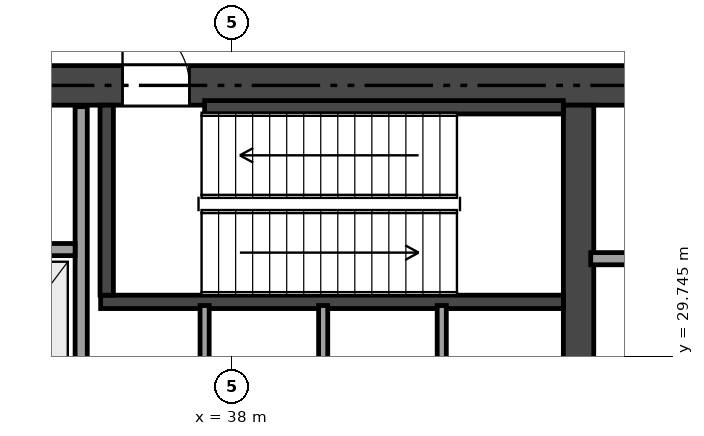
"""IFC4 building model, lengths in metres.
Left out: names, types, materials, properties, quantities, classifications, styles, units other than length and angle.
Written with IfcOpenShell. Run it as: python <this file> out.ifc"""

import sys

from ifc_helpers import new_model, si_unit, direction, frame, frame_2d, origin, place, context, subcontext, project, spatial, rectangle, extrude, element, fill, save


model = new_model("IFC4")
c1 = context("Model", 3, precision=1e-05, world=origin(), true_north=direction((0.0, 1.0)))
c2 = subcontext(c1, "Body", "Model", "MODEL_VIEW")
j1 = project(units=[si_unit("LENGTHUNIT", "METRE"), si_unit("PLANEANGLEUNIT", "RADIAN")], contexts=[c1])
p1 = place(None, origin())
s1 = spatial("IfcSite", under=j1, at=p1, CompositionType="ELEMENT")
p2 = place(p1, origin())
s2 = spatial("IfcBuilding", under=s1, at=p2, CompositionType="ELEMENT")
p3 = place(p2, frame((0.0, 0.0, -5.4)))
s3 = spatial("IfcBuildingStorey", under=s2, at=p3, CompositionType="ELEMENT", Elevation=-5.4)
p4 = place(p3, frame((26.475, 34.2, 0.0), z_axis=(0.0, 0.0, 1.0), x_axis=(1.0, 0.0, 0.0)))
e1 = element("IfcWall", 1, at=p4, inside=s3, PredefinedType="SHEAR", context=c2, shape_type="SweptSolid", body=[
    extrude(rectangle(XDim=21.45, YDim=0.65, at=frame_2d((10.725, 0.0))), origin(), (0.0, 0.0, 1.0), 5.05),
])
p5 = place(p4, frame((9.725, 0.0, 0.0)))
e2 = element("IfcOpeningElement", 2, at=p5, cuts=e1, PredefinedType="OPENING", context=c2, shape_type="SweptSolid", body=[
    extrude(rectangle(XDim=1.1, YDim=2.15, at=frame_2d((0.55, 1.075))), frame((0.0, 0.335, 0.0), z_axis=(0.0, -1.0, 0.0), x_axis=(1.0, 0.0, 0.0)), (0.0, 0.0, 1.0), 0.67),
])
p6 = place(p4, frame((1.975, 0.0, 0.0)))
e3 = element("IfcOpeningElement", 3, at=p6, cuts=e1, PredefinedType="OPENING", context=c2, shape_type="SweptSolid", body=[
    extrude(rectangle(XDim=0.9, YDim=2.1, at=frame_2d((0.45, 1.05))), frame((0.0, 0.335, 0.0), z_axis=(0.0, -1.0, 0.0), x_axis=(1.0, 0.0, 0.0)), (0.0, 0.0, 1.0), 0.67),
])
p7 = place(p4, frame((6.275, 0.0, 0.0)))
e4 = element("IfcOpeningElement", 4, at=p7, cuts=e1, PredefinedType="OPENING", context=c2, shape_type="SweptSolid", body=[
    extrude(rectangle(XDim=0.9, YDim=2.1, at=frame_2d((0.45, 1.05))), frame((0.0, 0.335, 0.0), z_axis=(0.0, -1.0, 0.0), x_axis=(1.0, 0.0, 0.0)), (0.0, 0.0, 1.0), 0.67),
])
p8 = place(p3, frame((43.7, 18.925, 0.0), z_axis=(0.0, 0.0, 1.0), x_axis=(0.0, 1.0, 0.0)))
e5 = element("IfcWall", 5, at=p8, inside=s3, PredefinedType="SHEAR", context=c2, shape_type="SweptSolid", body=[
    extrude(rectangle(XDim=14.95, YDim=0.5, at=frame_2d((7.475, 0.0))), origin(), (0.0, 0.0, 1.0), 5.05),
])
p9 = place(p8, frame((8.075, 0.0, 0.0)))
e6 = element("IfcOpeningElement", 6, at=p9, cuts=e5, PredefinedType="OPENING", context=c2, shape_type="SweptSolid", body=[
    extrude(rectangle(XDim=0.9, YDim=2.1, at=frame_2d((0.45, 1.05))), frame((0.0, 0.26, 0.0), z_axis=(0.0, -1.0, 0.0), x_axis=(1.0, 0.0, 0.0)), (0.0, 0.0, 1.0), 0.52),
])
p10 = place(p3, frame((35.84, 30.64, 0.0), z_axis=(0.0, 0.0, 1.0), x_axis=(1.0, 0.0, 0.0)))
e7 = element("IfcWall", 7, at=p10, inside=s3, PredefinedType="SHEAR", context=c2, shape_type="SweptSolid", body=[
    extrude(rectangle(XDim=7.61, YDim=0.22, at=frame_2d((3.805, 0.0))), origin(), (0.0, 0.0, 1.0), 5.05),
])
p11 = place(p3, frame((35.94, 30.75, 0.0), z_axis=(0.0, 0.0, 1.0), x_axis=(0.0, 1.0, 0.0)))
e8 = element("IfcWall", 8, at=p11, inside=s3, PredefinedType="SHEAR", context=c2, shape_type="SweptSolid", body=[
    extrude(rectangle(XDim=3.125, YDim=0.22, at=frame_2d((1.562, 0.0))), origin(), (0.0, 0.0, 1.0), 5.05),
])
p12 = place(p3, frame((37.55, 33.84, 0.0), z_axis=(0.0, 0.0, 1.0), x_axis=(1.0, 0.0, 0.0)))
e9 = element("IfcWall", 9, at=p12, inside=s3, PredefinedType="SHEAR", context=c2, shape_type="SweptSolid", body=[
    extrude(rectangle(XDim=5.9, YDim=0.22, at=frame_2d((2.95, 0.0))), origin(), (0.0, 0.0, 1.0), 5.05),
])
p13 = place(p3, frame((43.9, 31.35, 0.0), z_axis=(0.0, 0.0, 1.0), x_axis=(1.0, 0.0, 0.0)))
e10 = element("IfcWall", 10, at=p13, inside=s3, PredefinedType="SOLIDWALL", context=c2, shape_type="SweptSolid", body=[
    extrude(rectangle(XDim=3.35, YDim=0.2, at=frame_2d((1.675, 0.0))), origin(), (0.0, 0.0, 1.0), 5.05),
])
p14 = place(p3, frame((35.52, 18.95, 0.0), z_axis=(0.0, 0.0, 1.0), x_axis=(0.0, 1.0, 0.0)))
e11 = element("IfcWall", 11, at=p14, inside=s3, PredefinedType="SOLIDWALL", context=c2, shape_type="SweptSolid", body=[
    extrude(rectangle(XDim=14.9, YDim=0.2, at=frame_2d((7.45, 0.0))), origin(), (0.0, 0.0, 1.0), 4.571),
])
p15 = place(p14, frame((7.755, 0.0, 0.0)))
e12 = element("IfcOpeningElement", 12, at=p15, cuts=e11, PredefinedType="OPENING", context=c2, shape_type="SweptSolid", body=[
    extrude(rectangle(XDim=0.95, YDim=2.15, at=frame_2d((0.475, 1.075))), frame((0.0, 0.11, 0.0), z_axis=(0.0, -1.0, 0.0), x_axis=(1.0, 0.0, 0.0)), (0.0, 0.0, 1.0), 0.22),
])
p16 = place(p14, frame((0.6, 0.0, 0.0)))
e13 = element("IfcOpeningElement", 13, at=p16, cuts=e11, PredefinedType="OPENING", context=c2, shape_type="SweptSolid", body=[
    extrude(rectangle(XDim=0.9, YDim=2.1, at=frame_2d((0.45, 1.05))), frame((0.0, 0.11, 0.0), z_axis=(0.0, -1.0, 0.0), x_axis=(1.0, 0.0, 0.0)), (0.0, 0.0, 1.0), 0.22),
])
p17 = place(p3, frame((31.0, 31.5, 0.0), z_axis=(0.0, 0.0, 1.0), x_axis=(1.0, 0.0, 0.0)))
e14 = element("IfcWall", 14, at=p17, inside=s3, PredefinedType="SOLIDWALL", context=c2, shape_type="SweptSolid", body=[
    extrude(rectangle(XDim=4.42, YDim=0.2, at=frame_2d((2.21, 0.0))), origin(), (0.0, 0.0, 1.0), 5.05),
])
for number, where, z_axis, x_axis in (
    (15, (37.55, 28.15, 0.0), (0.0, 0.0, 1.0), (0.0, 1.0, 0.0)),
    (16, (39.5, 28.15, 0.0), (0.0, 0.0, 1.0), (0.0, 1.0, 0.0)),
    (17, (41.45, 28.15, 0.0), (0.0, 0.0, 1.0), (0.0, 1.0, 0.0)),
):
    element("IfcWall", number, at=place(p3, frame(where, z_axis=z_axis, x_axis=x_axis)), inside=s3, PredefinedType="PARTITIONING", context=c2, shape_type="SweptSolid", body=[
        extrude(rectangle(XDim=2.43, YDim=0.15, at=frame_2d((1.215, 0.0))), origin(), (0.0, 0.0, 1.0), 5.05),
    ])
p18 = place(p5, origin())
e18 = element("IfcDoor", 18, at=p18, inside=s3, OperationType="SINGLE_SWING_LEFT", PredefinedType="DOOR", context=c2, shape_type="SweptSolid", body=[
    extrude(rectangle(XDim=1.1, YDim=2.15, at=frame_2d((0.55, 1.075))), frame((0.0, 0.025, 0.0), z_axis=(0.0, -1.0, 0.0), x_axis=(1.0, 0.0, 0.0)), (0.0, 0.0, 1.0), 0.05),
])
fill(e2, e18)
save(model, sys.argv[1])
